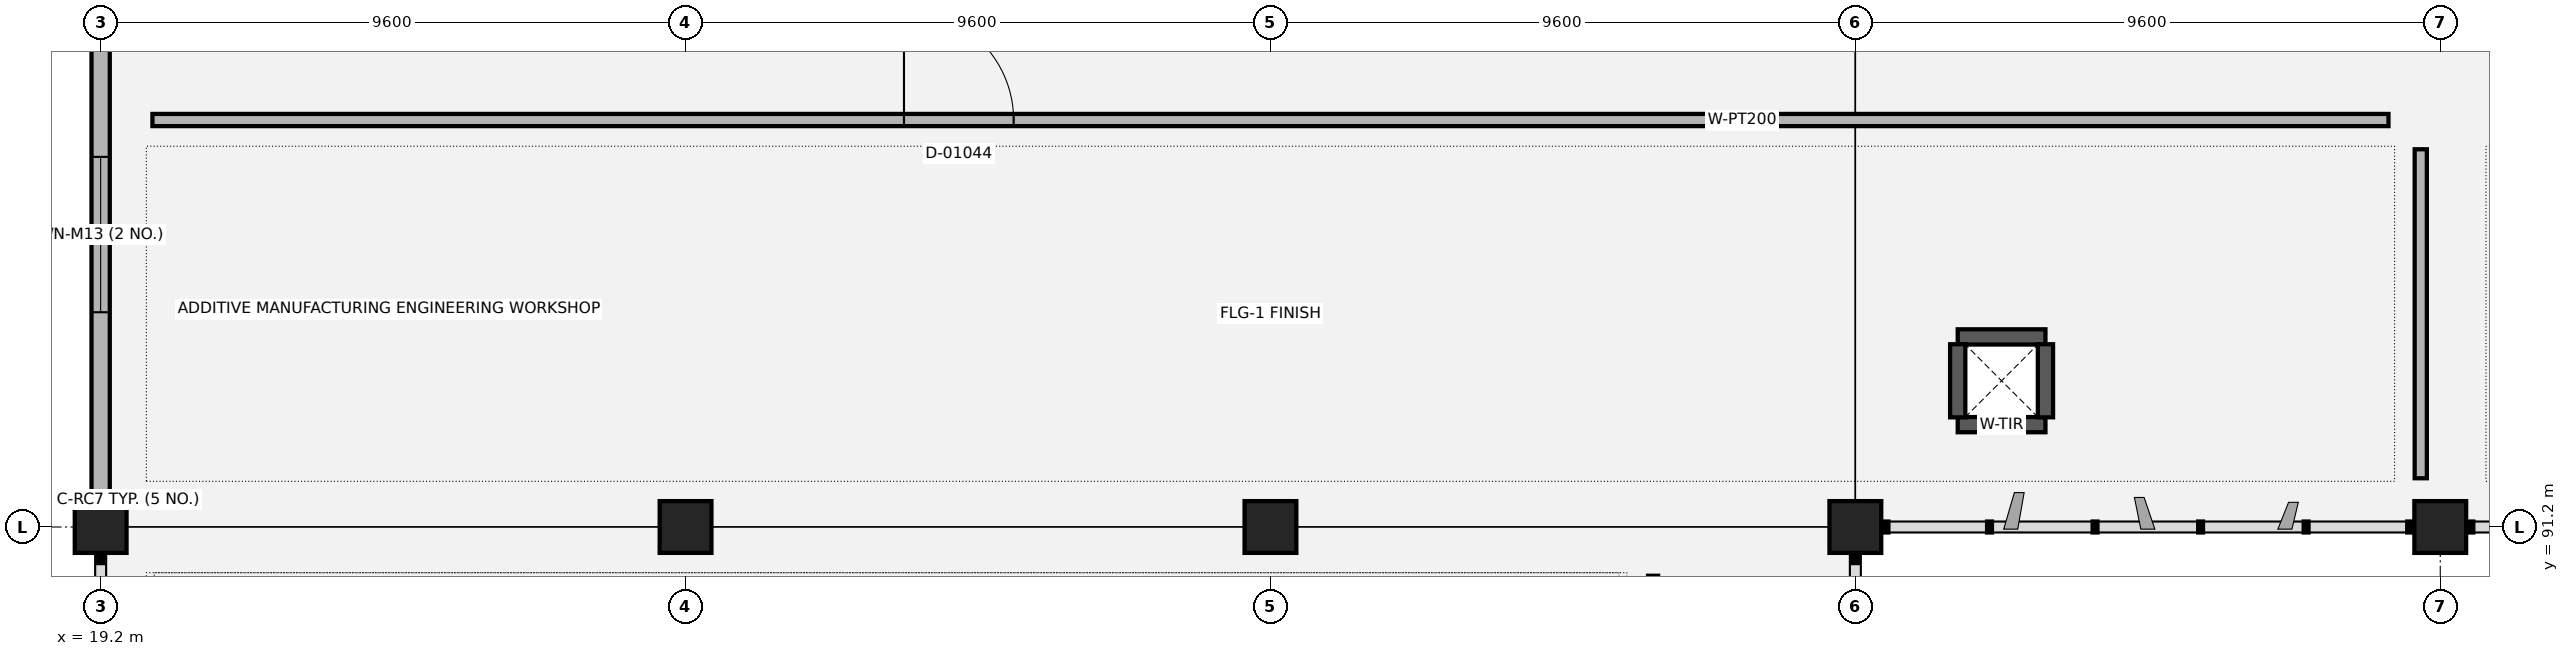
"""IFC4 building model, lengths in metres.
Left out: names, types, materials, properties, quantities, classifications, styles, units other than length and angle.
Written with IfcOpenShell. Run it as: python <this file> out.ifc"""

import sys

from ifc_helpers import new_model, si_unit, direction, frame, frame_2d, origin, origin_2d, place, context, subcontext, project, spatial, rectangle, extrude, element, fill, save


model = new_model("IFC4")
c1 = context("Model", 3, precision=1e-05, world=origin(), true_north=direction((0.0, 1.0)))
c2 = subcontext(c1, "Body", "Model", "MODEL_VIEW")
j1 = project(units=[si_unit("LENGTHUNIT", "METRE"), si_unit("PLANEANGLEUNIT", "RADIAN")], contexts=[c1])
p1 = place(None, origin())
s1 = spatial("IfcSite", under=j1, at=p1, CompositionType="ELEMENT")
p2 = place(p1, origin())
s2 = spatial("IfcBuilding", under=s1, at=p2, CompositionType="ELEMENT")
p3 = place(p2, frame((0.0, 0.0, 5.4)))
s3 = spatial("IfcBuildingStorey", under=s2, at=p3, CompositionType="ELEMENT", Elevation=5.4)
for number, where, z_axis, x_axis in (
    (1, (19.2, 91.2, 0.0), (0.0, 0.0, 1.0), (1.0, 0.0, 0.0)),
    (2, (28.8, 91.2, 0.0), (0.0, 0.0, 1.0), (1.0, 0.0, 0.0)),
    (3, (38.4, 91.2, 0.0), (0.0, 0.0, 1.0), (1.0, 0.0, 0.0)),
    (4, (48.0, 91.2, 0.0), (0.0, 0.0, 1.0), (1.0, 0.0, 0.0)),
    (5, (57.6, 91.2, 0.0), (0.0, 0.0, 1.0), (1.0, 0.0, 0.0)),
):
    element("IfcColumn", number, at=place(p3, frame(where, z_axis=z_axis, x_axis=x_axis)), inside=s3, PredefinedType="COLUMN", context=c2, shape_type="SweptSolid", body=[
        extrude(rectangle(XDim=0.85, YDim=0.85, at=origin_2d()), origin(), (0.0, 0.0, 1.0), 4.8),
    ])
for number, where, z_axis, x_axis in (
    (6, (49.68, 92.88, 0.0), (0.0, 0.0, 1.0), (1.0, 0.0, 0.0)),
    (7, (49.68, 94.32, 0.0), (0.0, 0.0, 1.0), (1.0, 0.0, 0.0)),
):
    element("IfcWall", number, at=place(p3, frame(where, z_axis=z_axis, x_axis=x_axis)), inside=s3, PredefinedType="SHEAR", context=c2, shape_type="SweptSolid", body=[
        extrude(rectangle(XDim=1.44, YDim=0.25, at=frame_2d((0.72, 0.0))), origin(), (0.0, 0.0, 1.0), 3.6),
    ])
for number, where, z_axis, x_axis in (
    (8, (49.68, 93.0, 0.0), (0.0, 0.0, 1.0), (0.0, 1.0, 0.0)),
    (9, (51.12, 93.0, 0.0), (0.0, 0.0, 1.0), (0.0, 1.0, 0.0)),
):
    element("IfcWall", number, at=place(p3, frame(where, z_axis=z_axis, x_axis=x_axis)), inside=s3, PredefinedType="SHEAR", context=c2, shape_type="SweptSolid", body=[
        extrude(rectangle(XDim=1.2, YDim=0.25, at=frame_2d((0.6, 0.0))), origin(), (0.0, 0.0, 1.0), 3.6),
    ])
p4 = place(p3, frame((19.2, 100.42, 0.0), z_axis=(0.0, 0.0, 1.0), x_axis=(0.0, -1.0, 0.0)))
e10 = element("IfcWall", 10, at=p4, inside=s3, PredefinedType="SOLIDWALL", context=c2, shape_type="SweptSolid", body=[
    extrude(rectangle(XDim=8.84, YDim=0.3, at=frame_2d((4.42, 0.0))), origin(), (0.0, 0.0, 1.0), 4.4),
])
p5 = place(p4, frame((3.145, 0.0, 0.9)))
e11 = element("IfcOpeningElement", 11, at=p5, cuts=e10, PredefinedType="OPENING", context=c2, shape_type="SweptSolid", body=[
    extrude(rectangle(XDim=2.55, YDim=1.75, at=frame_2d((1.275, 0.875))), frame((0.0, 0.16, 0.0), z_axis=(0.0, -1.0, 0.0), x_axis=(1.0, 0.0, 0.0)), (0.0, 0.0, 1.0), 0.32),
])
p6 = place(p3, frame((20.05, 97.88, 0.0), z_axis=(0.0, 0.0, 1.0), x_axis=(1.0, 0.0, 0.0)))
e12 = element("IfcWall", 12, at=p6, inside=s3, PredefinedType="PARTITIONING", context=c2, shape_type="SweptSolid", body=[
    extrude(rectangle(XDim=36.7, YDim=0.2, at=frame_2d((18.35, 0.0))), origin(), (0.0, 0.0, 1.0), 3.26),
])
p7 = place(p6, frame((12.335, 0.0, 0.0)))
e13 = element("IfcOpeningElement", 13, at=p7, cuts=e12, PredefinedType="OPENING", context=c2, shape_type="SweptSolid", body=[
    extrude(rectangle(XDim=1.8, YDim=2.2, at=frame_2d((0.9, 1.1))), frame((0.0, 0.11, 0.0), z_axis=(0.0, -1.0, 0.0), x_axis=(1.0, 0.0, 0.0)), (0.0, 0.0, 1.0), 0.22),
])
p8 = place(p3, frame((57.28, 92.0, 0.0), z_axis=(0.0, 0.0, 1.0), x_axis=(0.0, 1.0, 0.0)))
e14 = element("IfcWall", 14, at=p8, inside=s3, PredefinedType="PARTITIONING", context=c2, shape_type="SweptSolid", body=[
    extrude(rectangle(XDim=5.4, YDim=0.2, at=frame_2d((2.7, 0.0))), origin(), (0.0, 0.0, 1.0), 3.26),
])
p9 = place(p5, origin())
e15 = element("IfcWindow", 15, at=p9, inside=s3, PartitioningType="SINGLE_PANEL", PredefinedType="WINDOW", context=c2, shape_type="SweptSolid", body=[
    extrude(rectangle(XDim=2.55, YDim=1.75, at=frame_2d((1.275, 0.875))), frame((0.0, 0.03, 0.0), z_axis=(0.0, -1.0, 0.0), x_axis=(1.0, 0.0, 0.0)), (0.0, 0.0, 1.0), 0.06),
])
fill(e11, e15)
p10 = place(p7, origin())
e16 = element("IfcDoor", 16, at=p10, inside=s3, OperationType="SINGLE_SWING_LEFT", PredefinedType="DOOR", context=c2, shape_type="SweptSolid", body=[
    extrude(rectangle(XDim=1.8, YDim=2.2, at=frame_2d((0.9, 1.1))), frame((0.0, 0.025, 0.0), z_axis=(0.0, -1.0, 0.0), x_axis=(1.0, 0.0, 0.0)), (0.0, 0.0, 1.0), 0.05),
])
fill(e13, e16)
save(model, sys.argv[1])
